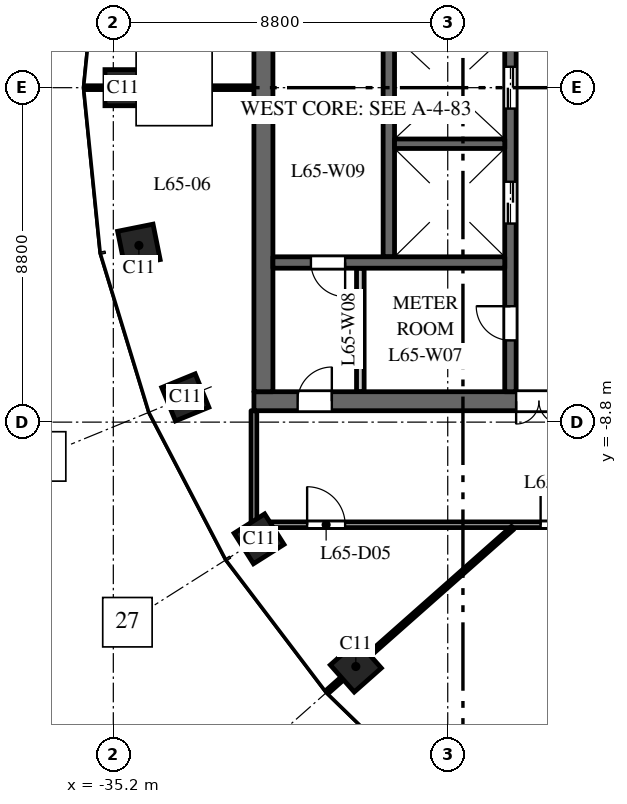
"""IFC4 building model, lengths in metres.
Left out: names, types, materials, properties, quantities, classifications, styles, units other than length and angle.
Written with IfcOpenShell. Run it as: python <this file> out.ifc"""

import sys

from ifc_helpers import new_model, si_unit, direction, frame, frame_2d, origin, origin_2d, place, context, subcontext, project, spatial, rectangle, extrude, element, fill, save


model = new_model("IFC4")
c1 = context("Model", 3, precision=1e-05, world=origin(), true_north=direction((0.0, 1.0)))
c2 = subcontext(c1, "Body", "Model", "MODEL_VIEW")
j1 = project(units=[si_unit("LENGTHUNIT", "METRE"), si_unit("PLANEANGLEUNIT", "RADIAN")], contexts=[c1])
p1 = place(None, origin())
s1 = spatial("IfcSite", under=j1, at=p1, CompositionType="ELEMENT")
p2 = place(p1, origin())
s2 = spatial("IfcBuilding", under=s1, at=p2, CompositionType="ELEMENT")
p3 = place(p2, frame((0.0, 0.0, 303.0)))
s3 = spatial("IfcBuildingStorey", under=s2, at=p3, CompositionType="ELEMENT", Elevation=303.0)
for number, where, z_axis, x_axis in (
    (1, (-34.945, 0.0, 0.0), (0.0, 0.0, 1.0), (0.0, -1.0, 0.0)),
    (2, (-34.527, -4.151, 0.0), (0.0, 0.0, 1.0), (0.197, -0.98, 0.0)),
    (3, (-33.305, -8.149, 0.0), (0.0, 0.0, 1.0), (0.379, -0.925, 0.0)),
    (4, (-31.365, -11.871, 0.0), (0.0, 0.0, 1.0), (0.535, -0.845, 0.0)),
    (5, (-28.819, -15.23, 0.0), (0.0, 0.0, 1.0), (0.663, -0.749, 0.0)),
):
    element("IfcColumn", number, at=place(p3, frame(where, z_axis=z_axis, x_axis=x_axis)), inside=s3, PredefinedType="COLUMN", context=c2, shape_type="SweptSolid", body=[
        extrude(rectangle(XDim=0.95, YDim=0.95, at=origin_2d()), origin(), (0.0, 0.0, 1.0), 4.0),
    ])
p4 = place(p3, frame((-16.5, -8.25, 0.0), z_axis=(0.0, 0.0, 1.0), x_axis=(-1.0, 0.0, 0.0)))
e6 = element("IfcWall", 6, at=p4, inside=s3, PredefinedType="SHEAR", context=c2, shape_type="SweptSolid", body=[
    extrude(rectangle(XDim=15.0, YDim=0.5, at=frame_2d((7.5, 0.0))), origin(), (0.0, 0.0, 1.0), 3.7),
])
p5 = place(p4, frame((6.9, 0.0, 0.0)))
e7 = element("IfcOpeningElement", 7, at=p5, cuts=e6, PredefinedType="OPENING", context=c2, shape_type="SweptSolid", body=[
    extrude(rectangle(XDim=1.2, YDim=2.1, at=frame_2d((0.6, 1.05))), frame((0.0, 0.26, 0.0), z_axis=(0.0, -1.0, 0.0), x_axis=(1.0, 0.0, 0.0)), (0.0, 0.0, 1.0), 0.52),
])
p6 = place(p4, frame((12.95, 0.0, 0.0)))
e8 = element("IfcOpeningElement", 8, at=p6, cuts=e6, PredefinedType="OPENING", context=c2, shape_type="SweptSolid", body=[
    extrude(rectangle(XDim=0.9, YDim=2.1, at=frame_2d((0.45, 1.05))), frame((0.0, 0.26, 0.0), z_axis=(0.0, -1.0, 0.0), x_axis=(1.0, 0.0, 0.0)), (0.0, 0.0, 1.0), 0.52),
])
p7 = place(p3, frame((-27.95, -4.45, 0.0), z_axis=(0.0, 0.0, 1.0), x_axis=(0.0, 1.0, 0.0)))
e9 = element("IfcWall", 9, at=p7, inside=s3, PredefinedType="SHEAR", context=c2, shape_type="SweptSolid", body=[
    extrude(rectangle(XDim=5.8, YDim=0.3, at=frame_2d((2.9, 0.0))), origin(), (0.0, 0.0, 1.0), 3.7),
])
p8 = place(p3, frame((-24.75, -8.0, 0.0), z_axis=(0.0, 0.0, 1.0), x_axis=(0.0, 1.0, 0.0)))
e10 = element("IfcWall", 10, at=p8, inside=s3, PredefinedType="SHEAR", context=c2, shape_type="SweptSolid", body=[
    extrude(rectangle(XDim=16.0, YDim=0.3, at=frame_2d((8.0, 0.0))), origin(), (0.0, 0.0, 1.0), 3.7),
])
p9 = place(p8, frame((4.425, 0.0, 0.0)))
e11 = element("IfcOpeningElement", 11, at=p9, cuts=e10, PredefinedType="OPENING", context=c2, shape_type="SweptSolid", body=[
    extrude(rectangle(XDim=1.1, YDim=2.1, at=frame_2d((0.55, 1.05))), frame((0.0, 0.16, 0.0), z_axis=(0.0, -1.0, 0.0), x_axis=(1.0, 0.0, 0.0)), (0.0, 0.0, 1.0), 0.32),
])
p10 = place(p8, frame((7.45, 0.0, 0.0)))
e12 = element("IfcOpeningElement", 12, at=p10, cuts=e10, PredefinedType="OPENING", context=c2, shape_type="SweptSolid", body=[
    extrude(rectangle(XDim=1.1, YDim=2.1, at=frame_2d((0.55, 1.05))), frame((0.0, 0.16, 0.0), z_axis=(0.0, -1.0, 0.0), x_axis=(1.0, 0.0, 0.0)), (0.0, 0.0, 1.0), 0.32),
])
p11 = place(p8, frame((10.575, 0.0, 0.0)))
e13 = element("IfcOpeningElement", 13, at=p11, cuts=e10, PredefinedType="OPENING", context=c2, shape_type="SweptSolid", body=[
    extrude(rectangle(XDim=0.9, YDim=2.1, at=frame_2d((0.45, 1.05))), frame((0.0, 0.16, 0.0), z_axis=(0.0, -1.0, 0.0), x_axis=(1.0, 0.0, 0.0)), (0.0, 0.0, 1.0), 0.32),
])
p12 = place(p8, frame((13.75, 0.0, 0.0)))
e14 = element("IfcOpeningElement", 14, at=p12, cuts=e10, PredefinedType="OPENING", context=c2, shape_type="SweptSolid", body=[
    extrude(rectangle(XDim=0.9, YDim=2.1, at=frame_2d((0.45, 1.05))), frame((0.0, 0.16, 0.0), z_axis=(0.0, -1.0, 0.0), x_axis=(1.0, 0.0, 0.0)), (0.0, 0.0, 1.0), 0.32),
])
p13 = place(p8, frame((1.35, 0.0, 0.0)))
e15 = element("IfcOpeningElement", 15, at=p13, cuts=e10, PredefinedType="OPENING", context=c2, shape_type="SweptSolid", body=[
    extrude(rectangle(XDim=0.9, YDim=2.1, at=frame_2d((0.45, 1.05))), frame((0.0, 0.16, 0.0), z_axis=(0.0, -1.0, 0.0), x_axis=(1.0, 0.0, 0.0)), (0.0, 0.0, 1.0), 0.32),
])
p14 = place(p3, frame((-31.25, -8.0, 0.0), z_axis=(0.0, 0.0, 1.0), x_axis=(0.0, 1.0, 0.0)))
e16 = element("IfcWall", 16, at=p14, inside=s3, PredefinedType="SHEAR", context=c2, shape_type="SweptSolid", body=[
    extrude(rectangle(XDim=16.0, YDim=0.5, at=frame_2d((8.0, 0.0))), origin(), (0.0, 0.0, 1.0), 3.7),
])
p15 = place(p3, frame((-28.7, -8.0, 0.0), z_axis=(0.0, 0.0, 1.0), x_axis=(0.0, 1.0, 0.0)))
e17 = element("IfcWall", 17, at=p15, inside=s3, PredefinedType="PARTITIONING", context=c2, shape_type="SweptSolid", body=[
    extrude(rectangle(XDim=3.25, YDim=0.2, at=frame_2d((1.625, 0.0))), origin(), (0.0, 0.0, 1.0), 3.7),
])
p16 = place(p3, frame((-24.9, -4.6, 0.0), z_axis=(0.0, 0.0, 1.0), x_axis=(-1.0, 0.0, 0.0)))
e18 = element("IfcWall", 18, at=p16, inside=s3, PredefinedType="SHEAR", context=c2, shape_type="SweptSolid", body=[
    extrude(rectangle(XDim=6.1, YDim=0.3, at=frame_2d((3.05, 0.0))), origin(), (0.0, 0.0, 1.0), 3.7),
])
p17 = place(p16, frame((4.2, 0.0, 0.0)))
e19 = element("IfcOpeningElement", 19, at=p17, cuts=e18, PredefinedType="OPENING", context=c2, shape_type="SweptSolid", body=[
    extrude(rectangle(XDim=0.9, YDim=2.1, at=frame_2d((0.45, 1.05))), frame((0.0, 0.16, 0.0), z_axis=(0.0, -1.0, 0.0), x_axis=(1.0, 0.0, 0.0)), (0.0, 0.0, 1.0), 0.32),
])
p18 = place(p3, frame((-24.9, -1.475, 0.0), z_axis=(0.0, 0.0, 1.0), x_axis=(-1.0, 0.0, 0.0)))
e20 = element("IfcWall", 20, at=p18, inside=s3, PredefinedType="SHEAR", context=c2, shape_type="SweptSolid", body=[
    extrude(rectangle(XDim=2.9, YDim=0.25, at=frame_2d((1.45, 0.0))), origin(), (0.0, 0.0, 1.0), 3.7),
])
p19 = place(p3, frame((-35.949, 0.0, 0.0), z_axis=(0.0, 0.0, 1.0), x_axis=(1.0, 0.0, 0.0)))
e21 = element("IfcWall", 21, at=p19, inside=s3, PredefinedType="PARTITIONING", context=c2, shape_type="SweptSolid", body=[
    extrude(rectangle(XDim=4.449, YDim=0.1, at=frame_2d((2.225, 0.0))), origin(), (0.0, 0.0, 1.0), 3.0),
])
p20 = place(p3, frame((-31.5, -11.5, 0.0), z_axis=(0.0, 0.0, 1.0), x_axis=(0.0, 1.0, 0.0)))
e22 = element("IfcWall", 22, at=p20, inside=s3, PredefinedType="PARTITIONING", context=c2, shape_type="SweptSolid", body=[
    extrude(rectangle(XDim=3.0, YDim=0.15, at=frame_2d((1.5, 0.0))), origin(), (0.0, 0.0, 1.0), 3.0),
])
p21 = place(p3, frame((-31.5, -11.5, 0.0), z_axis=(0.0, 0.0, 1.0), x_axis=(1.0, 0.0, 0.0)))
e23 = element("IfcWall", 23, at=p21, inside=s3, PredefinedType="PARTITIONING", context=c2, shape_type="SweptSolid", body=[
    extrude(rectangle(XDim=21.432, YDim=0.15, at=frame_2d((10.716, 0.0))), origin(), (0.0, 0.0, 1.0), 2.75),
])
p22 = place(p21, frame((1.4, 0.0, 0.0)))
e24 = element("IfcOpeningElement", 24, at=p22, cuts=e23, PredefinedType="OPENING", context=c2, shape_type="SweptSolid", body=[
    extrude(rectangle(XDim=1.0, YDim=2.1, at=frame_2d((0.5, 1.05))), frame((0.0, 0.085, 0.0), z_axis=(0.0, -1.0, 0.0), x_axis=(1.0, 0.0, 0.0)), (0.0, 0.0, 1.0), 0.17),
])
p23 = place(p21, frame((7.544, 0.0, 0.0)))
e25 = element("IfcOpeningElement", 25, at=p23, cuts=e23, PredefinedType="OPENING", context=c2, shape_type="SweptSolid", body=[
    extrude(rectangle(XDim=1.0, YDim=2.1, at=frame_2d((0.5, 1.05))), frame((0.0, 0.085, 0.0), z_axis=(0.0, -1.0, 0.0), x_axis=(1.0, 0.0, 0.0)), (0.0, 0.0, 1.0), 0.17),
])
p24 = place(p3, frame((-29.569, -15.895, 0.0), z_axis=(0.0, 0.0, 1.0), x_axis=(0.748988695283, 0.662582775461, 0.0)))
e26 = element("IfcWall", 26, at=p24, inside=s3, PredefinedType="PARTITIONING", context=c2, shape_type="SweptSolid", body=[
    extrude(rectangle(XDim=6.516, YDim=0.1, at=frame_2d((3.258, 0.0))), origin(), (0.0, 0.0, 1.0), 3.0),
])
p25 = place(p9, origin())
e27 = element("IfcDoor", 27, at=p25, inside=s3, OperationType="DOUBLE_DOOR_SLIDING", PredefinedType="DOOR", context=c2, shape_type="SweptSolid", body=[
    extrude(rectangle(XDim=1.1, YDim=2.1, at=frame_2d((0.55, 1.05))), frame((0.0, 0.025, 0.0), z_axis=(0.0, -1.0, 0.0), x_axis=(1.0, 0.0, 0.0)), (0.0, 0.0, 1.0), 0.05),
])
fill(e11, e27)
p26 = place(p10, origin())
e28 = element("IfcDoor", 28, at=p26, inside=s3, OperationType="DOUBLE_DOOR_SLIDING", PredefinedType="DOOR", context=c2, shape_type="SweptSolid", body=[
    extrude(rectangle(XDim=1.1, YDim=2.1, at=frame_2d((0.55, 1.05))), frame((0.0, 0.025, 0.0), z_axis=(0.0, -1.0, 0.0), x_axis=(1.0, 0.0, 0.0)), (0.0, 0.0, 1.0), 0.05),
])
fill(e12, e28)
p27 = place(p5, origin())
e29 = element("IfcDoor", 29, at=p27, inside=s3, OperationType="DOUBLE_DOOR_DOUBLE_SWING", PredefinedType="DOOR", context=c2, shape_type="SweptSolid", body=[
    extrude(rectangle(XDim=1.2, YDim=2.1, at=frame_2d((0.6, 1.05))), frame((0.0, 0.025, 0.0), z_axis=(0.0, -1.0, 0.0), x_axis=(1.0, 0.0, 0.0)), (0.0, 0.0, 1.0), 0.05),
])
fill(e7, e29)
p28 = place(p13, origin())
e30 = element("IfcDoor", 30, at=p28, inside=s3, OperationType="SINGLE_SWING_LEFT", PredefinedType="DOOR", context=c2, shape_type="SweptSolid", body=[
    extrude(rectangle(XDim=0.9, YDim=2.1, at=frame_2d((0.45, 1.05))), frame((0.0, 0.025, 0.0), z_axis=(0.0, -1.0, 0.0), x_axis=(1.0, 0.0, 0.0)), (0.0, 0.0, 1.0), 0.05),
])
fill(e15, e30)
p29 = place(p6, origin())
e31 = element("IfcDoor", 31, at=p29, inside=s3, OperationType="SINGLE_SWING_LEFT", PredefinedType="DOOR", context=c2, shape_type="SweptSolid", body=[
    extrude(rectangle(XDim=0.9, YDim=2.1, at=frame_2d((0.45, 1.05))), frame((0.0, 0.025, 0.0), z_axis=(0.0, -1.0, 0.0), x_axis=(1.0, 0.0, 0.0)), (0.0, 0.0, 1.0), 0.05),
])
fill(e8, e31)
p30 = place(p17, origin())
e32 = element("IfcDoor", 32, at=p30, inside=s3, OperationType="SINGLE_SWING_RIGHT", PredefinedType="DOOR", context=c2, shape_type="SweptSolid", body=[
    extrude(rectangle(XDim=0.9, YDim=2.1, at=frame_2d((0.45, 1.05))), frame((0.0, 0.025, 0.0), z_axis=(0.0, -1.0, 0.0), x_axis=(1.0, 0.0, 0.0)), (0.0, 0.0, 1.0), 0.05),
])
fill(e19, e32)
p31 = place(p22, origin())
e33 = element("IfcDoor", 33, at=p31, inside=s3, OperationType="SINGLE_SWING_LEFT", PredefinedType="DOOR", context=c2, shape_type="SweptSolid", body=[
    extrude(rectangle(XDim=1.0, YDim=2.1, at=frame_2d((0.5, 1.05))), frame((0.0, 0.025, 0.0), z_axis=(0.0, -1.0, 0.0), x_axis=(1.0, 0.0, 0.0)), (0.0, 0.0, 1.0), 0.05),
])
fill(e24, e33)
p32 = place(p23, origin())
e34 = element("IfcDoor", 34, at=p32, inside=s3, OperationType="SINGLE_SWING_LEFT", PredefinedType="DOOR", context=c2, shape_type="SweptSolid", body=[
    extrude(rectangle(XDim=1.0, YDim=2.1, at=frame_2d((0.5, 1.05))), frame((0.0, 0.025, 0.0), z_axis=(0.0, -1.0, 0.0), x_axis=(1.0, 0.0, 0.0)), (0.0, 0.0, 1.0), 0.05),
])
fill(e25, e34)
save(model, sys.argv[1])
